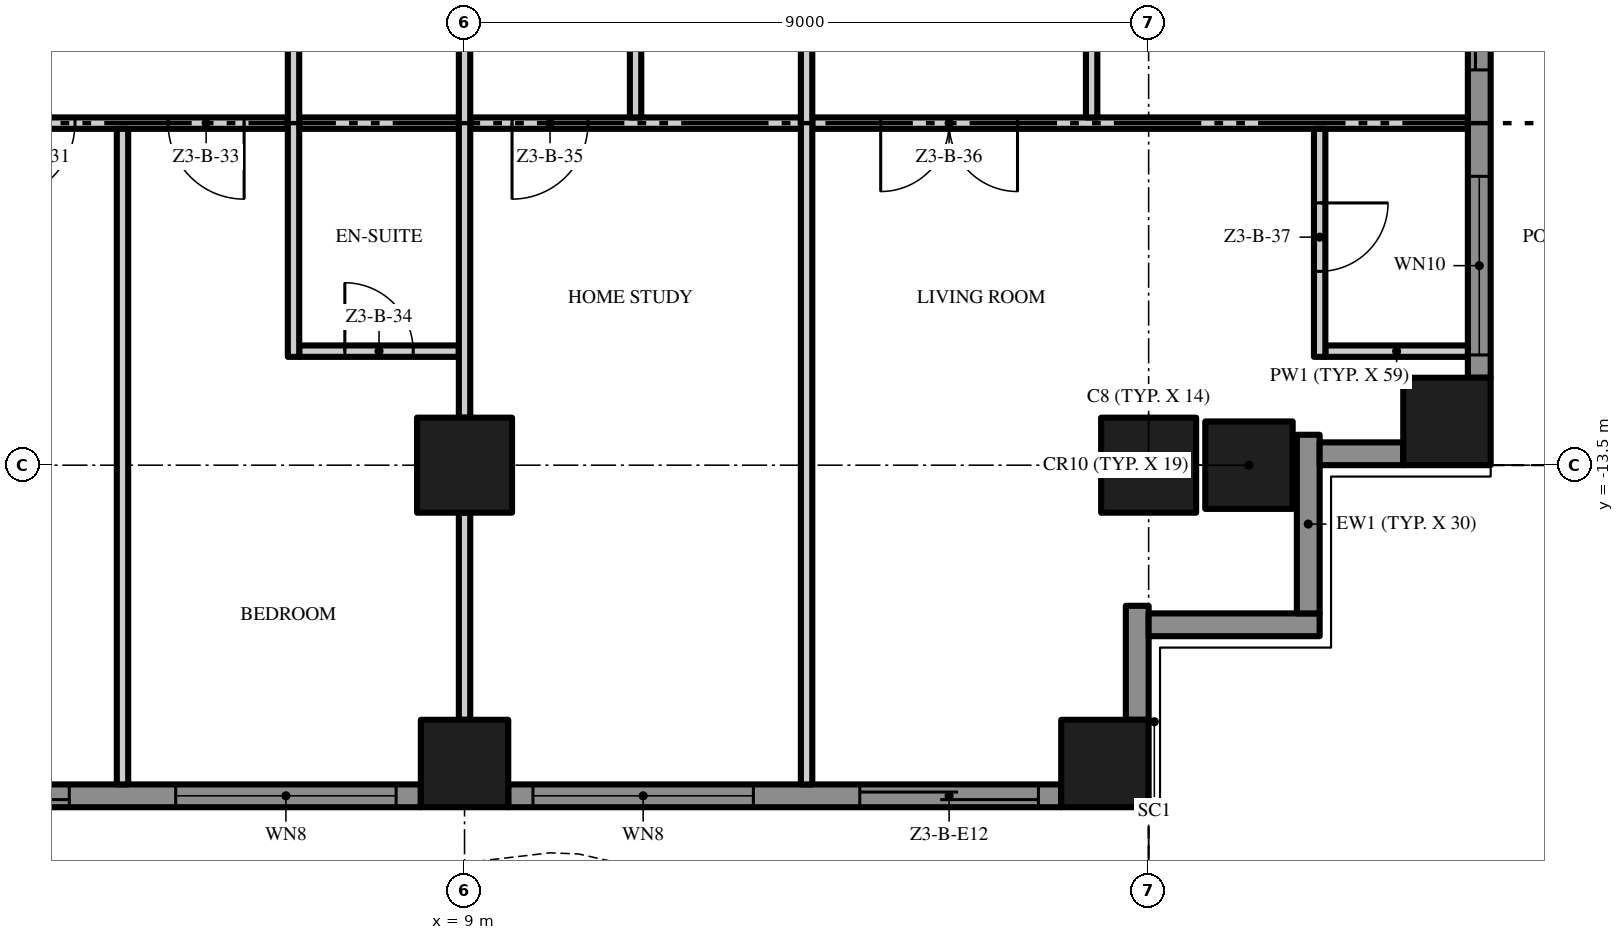
"""IFC4 building model, lengths in metres.
Left out: names, types, materials, properties, quantities, classifications, styles, units other than length and angle.
Written with IfcOpenShell. Run it as: python <this file> out.ifc"""

import sys

from ifc_helpers import new_model, si_unit, direction, frame, frame_2d, origin, origin_2d, place, context, subcontext, project, spatial, polyline, rectangle, outline, extrude, element, fill, save


model = new_model("IFC4")
c1 = context("Model", 3, precision=1e-05, world=origin(), true_north=direction((0.0, 1.0)))
c2 = subcontext(c1, "Body", "Model", "MODEL_VIEW")
j1 = project(units=[si_unit("LENGTHUNIT", "METRE"), si_unit("PLANEANGLEUNIT", "RADIAN")], contexts=[c1])
p1 = place(None, origin())
s1 = spatial("IfcSite", under=j1, at=p1, CompositionType="ELEMENT")
p2 = place(p1, origin())
s2 = spatial("IfcBuilding", under=s1, at=p2, CompositionType="ELEMENT")
p3 = place(p2, frame((0.0, 0.0, 140.2)))
s3 = spatial("IfcBuildingStorey", under=s2, at=p3, CompositionType="ELEMENT", Elevation=140.2)
p4 = place(p3, frame((18.0, -13.5, 0.0), z_axis=(0.0, 0.0, 1.0), x_axis=(1.0, 0.0, 0.0)))
e1 = element("IfcColumn", 1, at=p4, inside=s3, PredefinedType="COLUMN", context=c2, shape_type="SweptSolid", body=[
    extrude(rectangle(XDim=1.25, YDim=1.25, at=origin_2d()), origin(), (0.0, 0.0, 1.0), 3.5),
])
for number, where, z_axis, x_axis in (
    (2, (17.425, -17.425, 0.0), (0.0, 0.0, 1.0), (1.0, 0.0, 0.0)),
    (3, (21.925, -12.925, 0.0), (0.0, 0.0, 1.0), (1.0, 0.0, 0.0)),
    (4, (19.32, -13.5, 0.0), (0.0, 0.0, 1.0), (1.0, 0.0, 0.0)),
):
    element("IfcColumn", number, at=place(p3, frame(where, z_axis=z_axis, x_axis=x_axis)), inside=s3, PredefinedType="COLUMN", context=c2, shape_type="SweptSolid", body=[
        extrude(rectangle(XDim=1.15, YDim=1.15, at=origin_2d()), origin(), (0.0, 0.0, 1.0), 3.5),
    ])
p5 = place(p3, frame((9.0, -13.5, 0.0), z_axis=(0.0, 0.0, 1.0), x_axis=(1.0, 0.0, 0.0)))
e5 = element("IfcColumn", 5, at=p5, inside=s3, PredefinedType="COLUMN", context=c2, shape_type="SweptSolid", body=[
    extrude(rectangle(XDim=1.25, YDim=1.25, at=origin_2d()), origin(), (0.0, 0.0, 1.0), 3.5),
])
p6 = place(p3, frame((9.0, -17.425, 0.0), z_axis=(0.0, 0.0, 1.0), x_axis=(1.0, 0.0, 0.0)))
e6 = element("IfcColumn", 6, at=p6, inside=s3, PredefinedType="COLUMN", context=c2, shape_type="SweptSolid", body=[
    extrude(rectangle(XDim=1.15, YDim=1.15, at=origin_2d()), origin(), (0.0, 0.0, 1.0), 3.5),
])
p7 = place(p3, frame((8.425, -17.85, 0.0), z_axis=(0.0, 0.0, 1.0), x_axis=(-1.0, 0.0, 0.0)))
e7 = element("IfcWall", 7, at=p7, inside=s3, PredefinedType="SOLIDWALL", context=c2, shape_type="SweptSolid", body=[
    extrude(rectangle(XDim=7.85, YDim=0.3, at=frame_2d((3.925, 0.0))), origin(), (0.0, 0.0, 1.0), 3.5),
])
p8 = place(p7, frame((4.625, 0.0, 0.0)))
e8 = element("IfcOpeningElement", 8, at=p8, cuts=e7, PredefinedType="OPENING", context=c2, shape_type="SweptSolid", body=[
    extrude(rectangle(XDim=2.9, YDim=2.4, at=frame_2d((1.45, 1.2))), frame((0.0, 0.16, 0.0), z_axis=(0.0, -1.0, 0.0), x_axis=(1.0, 0.0, 0.0)), (0.0, 0.0, 1.0), 0.32),
])
p9 = place(p7, frame((0.325, 0.0, 0.45)))
e9 = element("IfcOpeningElement", 9, at=p9, cuts=e7, PredefinedType="OPENING", context=c2, shape_type="SweptSolid", body=[
    extrude(rectangle(XDim=2.9, YDim=2.65, at=frame_2d((1.45, 1.325))), frame((0.0, 0.16, 0.0), z_axis=(0.0, -1.0, 0.0), x_axis=(1.0, 0.0, 0.0)), (0.0, 0.0, 1.0), 0.32),
])
p10 = place(p3, frame((16.85, -17.85, 0.0), z_axis=(0.0, 0.0, 1.0), x_axis=(-1.0, 0.0, 0.0)))
e10 = element("IfcWall", 10, at=p10, inside=s3, PredefinedType="SOLIDWALL", context=c2, shape_type="SweptSolid", body=[
    extrude(rectangle(XDim=7.275, YDim=0.3, at=frame_2d((3.638, 0.0))), origin(), (0.0, 0.0, 1.0), 3.5),
])
p11 = place(p10, frame((4.05, 0.0, 0.45)))
e11 = element("IfcOpeningElement", 11, at=p11, cuts=e10, PredefinedType="OPENING", context=c2, shape_type="SweptSolid", body=[
    extrude(rectangle(XDim=2.9, YDim=2.65, at=frame_2d((1.45, 1.325))), frame((0.0, 0.16, 0.0), z_axis=(0.0, -1.0, 0.0), x_axis=(1.0, 0.0, 0.0)), (0.0, 0.0, 1.0), 0.32),
])
p12 = place(p10, frame((0.3, 0.0, 0.0)))
e12 = element("IfcOpeningElement", 12, at=p12, cuts=e10, PredefinedType="OPENING", context=c2, shape_type="SweptSolid", body=[
    extrude(rectangle(XDim=2.35, YDim=2.4, at=frame_2d((1.175, 1.2))), frame((0.0, 0.16, 0.0), z_axis=(0.0, -1.0, 0.0), x_axis=(1.0, 0.0, 0.0)), (0.0, 0.0, 1.0), 0.32),
])
p13 = place(p3, frame((17.85, -15.35, 0.0), z_axis=(0.0, 0.0, 1.0), x_axis=(0.0, -1.0, 0.0)))
e13 = element("IfcWall", 13, at=p13, inside=s3, PredefinedType="SOLIDWALL", context=c2, shape_type="SweptSolid", body=[
    extrude(rectangle(XDim=1.5, YDim=0.3, at=frame_2d((0.75, 0.0))), origin(), (0.0, 0.0, 1.0), 3.5),
])
p14 = place(p3, frame((20.25, -15.6, 0.0), z_axis=(0.0, 0.0, 1.0), x_axis=(-1.0, 0.0, 0.0)))
e14 = element("IfcWall", 14, at=p14, inside=s3, PredefinedType="SOLIDWALL", context=c2, shape_type="SweptSolid", body=[
    extrude(rectangle(XDim=2.25, YDim=0.3, at=frame_2d((1.125, 0.0))), origin(), (0.0, 0.0, 1.0), 3.5),
])
p15 = place(p3, frame((20.1, -13.1, 0.0), z_axis=(0.0, 0.0, 1.0), x_axis=(0.0, -1.0, 0.0)))
e15 = element("IfcWall", 15, at=p15, inside=s3, PredefinedType="SOLIDWALL", context=c2, shape_type="SweptSolid", body=[
    extrude(rectangle(XDim=2.35, YDim=0.3, at=frame_2d((1.175, 0.0))), origin(), (0.0, 0.0, 1.0), 3.5),
])
p16 = place(p3, frame((21.35, -13.35, 0.0), z_axis=(0.0, 0.0, 1.0), x_axis=(-1.0, 0.0, 0.0)))
e16 = element("IfcWall", 16, at=p16, inside=s3, PredefinedType="SOLIDWALL", context=c2, shape_type="SweptSolid", body=[
    extrude(rectangle(XDim=1.1, YDim=0.3, at=frame_2d((0.55, 0.0))), origin(), (0.0, 0.0, 1.0), 3.5),
])
p17 = place(p3, frame((22.35, -5.075, 0.0), z_axis=(0.0, 0.0, 1.0), x_axis=(0.0, -1.0, 0.0)))
e17 = element("IfcWall", 17, at=p17, inside=s3, PredefinedType="SOLIDWALL", context=c2, shape_type="SweptSolid", body=[
    extrude(rectangle(XDim=7.275, YDim=0.3, at=frame_2d((3.638, 0.0))), origin(), (0.0, 0.0, 1.0), 3.5),
])
p18 = place(p17, frame((4.625, 0.0, 0.45)))
e18 = element("IfcOpeningElement", 18, at=p18, cuts=e17, PredefinedType="OPENING", context=c2, shape_type="SweptSolid", body=[
    extrude(rectangle(XDim=2.35, YDim=2.65, at=frame_2d((1.175, 1.325))), frame((0.0, 0.16, 0.0), z_axis=(0.0, -1.0, 0.0), x_axis=(1.0, 0.0, 0.0)), (0.0, 0.0, 1.0), 0.32),
])
p19 = place(p17, frame((0.325, 0.0, 0.0)))
e19 = element("IfcOpeningElement", 19, at=p19, cuts=e17, PredefinedType="OPENING", context=c2, shape_type="SweptSolid", body=[
    extrude(rectangle(XDim=2.9, YDim=2.4, at=frame_2d((1.45, 1.2))), frame((0.0, 0.16, 0.0), z_axis=(0.0, -1.0, 0.0), x_axis=(1.0, 0.0, 0.0)), (0.0, 0.0, 1.0), 0.32),
])
p20 = place(p3, origin())
e20 = element("IfcWall", 20, at=p20, inside=s3, PredefinedType="USERDEFINED", context=c2, shape_type="SweptSolid", body=[
    extrude(outline(polyline([(-18.0, -18.951), (-16.5, -19.612), (-15.0, -20.345), (-13.5, -20.869), (-12.375, -21.0), (-12.0, -20.985), (-10.5, -20.649), (-9.0, -19.988), (-7.5, -19.255), (-6.0, -18.731), (-4.875, -18.6), (-4.5, -18.615), (-3.0, -18.951), (-1.5, -19.612), (0.0, -20.345), (1.5, -20.869), (2.625, -21.0), (3.0, -20.985), (4.5, -20.649), (6.0, -19.988), (7.5, -19.255), (9.0, -18.731), (10.125, -18.6), (10.5, -18.615), (12.0, -18.951), (13.5, -19.612), (15.0, -20.345), (16.5, -20.869), (17.625, -21.0), (18.0, -20.985), (17.99, -20.735), (17.635, -20.749), (16.556, -20.624), (15.096, -20.114), (13.605, -19.385), (12.079, -18.713), (10.533, -18.366), (10.115, -18.349), (8.944, -18.486), (7.404, -19.024), (5.895, -19.761), (4.421, -20.41), (2.967, -20.736), (2.635, -20.749), (1.556, -20.624), (0.096, -20.114), (-1.395, -19.385), (-2.921, -18.713), (-4.467, -18.366), (-4.885, -18.349), (-6.056, -18.486), (-7.596, -19.024), (-9.105, -19.761), (-10.579, -20.41), (-12.033, -20.736), (-12.365, -20.749), (-13.444, -20.624), (-14.904, -20.114), (-16.395, -19.385), (-17.899, -18.723), (-18.0, -18.951)])), origin(), (0.0, 0.0, 1.0), 0.9),
])
p21 = place(p3, origin())
e21 = element("IfcWall", 21, at=p21, inside=s3, PredefinedType="USERDEFINED", context=c2, shape_type="SweptSolid", body=[
    extrude(outline(polyline([(23.451, -13.5), (24.112, -12.0), (24.845, -10.5), (25.369, -9.0), (25.5, -7.875), (25.485, -7.5), (25.149, -6.0), (24.488, -4.5), (23.755, -3.0), (23.231, -1.5), (23.1, -0.375), (23.115, 0.0), (23.451, 1.5), (24.112, 3.0), (24.845, 4.5), (25.369, 6.0), (25.5, 7.125), (25.485, 7.5), (25.149, 9.0), (24.488, 10.5), (23.755, 12.0), (23.231, 13.5), (23.1, 14.625), (23.115, 15.0), (23.451, 16.5), (24.112, 18.0), (23.883, 18.101), (23.213, 16.579), (22.866, 15.033), (22.849, 14.615), (22.986, 13.444), (23.524, 11.904), (24.261, 10.395), (24.91, 8.921), (25.236, 7.467), (25.249, 7.135), (25.124, 6.056), (24.614, 4.596), (23.885, 3.105), (23.213, 1.579), (22.866, 0.033), (22.849, -0.385), (22.986, -1.556), (23.524, -3.096), (24.261, -4.605), (24.91, -6.079), (25.236, -7.533), (25.249, -7.865), (25.124, -8.944), (24.614, -10.404), (23.885, -11.895), (23.223, -13.399), (23.451, -13.5)])), origin(), (0.0, 0.0, 1.0), 0.9),
])
p22 = place(p3, frame((6.825, -12.0, 0.0), z_axis=(0.0, 0.0, 1.0), x_axis=(1.0, 0.0, 0.0)))
e22 = element("IfcWall", 22, at=p22, inside=s3, PredefinedType="PARTITIONING", context=c2, shape_type="SweptSolid", body=[
    extrude(rectangle(XDim=2.1, YDim=0.15, at=frame_2d((1.05, 0.0))), origin(), (0.0, 0.0, 1.0), 3.5),
])
p23 = place(p22, frame((0.6, 0.0, 0.0)))
e23 = element("IfcOpeningElement", 23, at=p23, cuts=e22, PredefinedType="OPENING", context=c2, shape_type="SweptSolid", body=[
    extrude(rectangle(XDim=0.9, YDim=2.1, at=frame_2d((0.45, 1.05))), frame((0.0, 0.085, 0.0), z_axis=(0.0, -1.0, 0.0), x_axis=(1.0, 0.0, 0.0)), (0.0, 0.0, 1.0), 0.17),
])
p24 = place(p3, frame((20.325, -12.0, 0.0), z_axis=(0.0, 0.0, 1.0), x_axis=(1.0, 0.0, 0.0)))
e24 = element("IfcWall", 24, at=p24, inside=s3, PredefinedType="PARTITIONING", context=c2, shape_type="SweptSolid", body=[
    extrude(rectangle(XDim=1.875, YDim=0.15, at=frame_2d((0.938, 0.0))), origin(), (0.0, 0.0, 1.0), 3.5),
])
p25 = place(p3, frame((6.675, -9.0, 0.0), z_axis=(0.0, 0.0, 1.0), x_axis=(-1.0, 0.0, 0.0)))
e25 = element("IfcWall", 25, at=p25, inside=s3, PredefinedType="PARTITIONING", context=c2, shape_type="SweptSolid", body=[
    extrude(rectangle(XDim=4.35, YDim=0.15, at=frame_2d((2.175, 0.0))), origin(), (0.0, 0.0, 1.0), 3.5),
])
p26 = place(p25, frame((2.8, 0.0, 0.0)))
e26 = element("IfcOpeningElement", 26, at=p26, cuts=e25, PredefinedType="OPENING", context=c2, shape_type="SweptSolid", body=[
    extrude(rectangle(XDim=1.0, YDim=2.4, at=frame_2d((0.5, 1.2))), frame((0.0, 0.085, 0.0), z_axis=(0.0, -1.0, 0.0), x_axis=(1.0, 0.0, 0.0)), (0.0, 0.0, 1.0), 0.17),
])
p27 = place(p25, frame((0.575, 0.0, 0.0)))
e27 = element("IfcOpeningElement", 27, at=p27, cuts=e25, PredefinedType="OPENING", context=c2, shape_type="SweptSolid", body=[
    extrude(rectangle(XDim=1.0, YDim=2.4, at=frame_2d((0.5, 1.2))), frame((0.0, 0.085, 0.0), z_axis=(0.0, -1.0, 0.0), x_axis=(1.0, 0.0, 0.0)), (0.0, 0.0, 1.0), 0.17),
])
p28 = place(p3, frame((6.825, -9.0, 0.0), z_axis=(0.0, 0.0, 1.0), x_axis=(1.0, 0.0, 0.0)))
e28 = element("IfcWall", 28, at=p28, inside=s3, PredefinedType="PARTITIONING", context=c2, shape_type="SweptSolid", body=[
    extrude(rectangle(XDim=2.1, YDim=0.15, at=frame_2d((1.05, 0.0))), origin(), (0.0, 0.0, 1.0), 3.5),
])
p29 = place(p3, frame((13.425, -9.0, 0.0), z_axis=(0.0, 0.0, 1.0), x_axis=(-1.0, 0.0, 0.0)))
e29 = element("IfcWall", 29, at=p29, inside=s3, PredefinedType="PARTITIONING", context=c2, shape_type="SweptSolid", body=[
    extrude(rectangle(XDim=4.35, YDim=0.15, at=frame_2d((2.175, 0.0))), origin(), (0.0, 0.0, 1.0), 3.5),
])
p30 = place(p29, frame((2.8, 0.0, 0.0)))
e30 = element("IfcOpeningElement", 30, at=p30, cuts=e29, PredefinedType="OPENING", context=c2, shape_type="SweptSolid", body=[
    extrude(rectangle(XDim=1.0, YDim=2.4, at=frame_2d((0.5, 1.2))), frame((0.0, 0.085, 0.0), z_axis=(0.0, -1.0, 0.0), x_axis=(1.0, 0.0, 0.0)), (0.0, 0.0, 1.0), 0.17),
])
p31 = place(p3, frame((22.2, -9.0, 0.0), z_axis=(0.0, 0.0, 1.0), x_axis=(-1.0, 0.0, 0.0)))
e31 = element("IfcWall", 31, at=p31, inside=s3, PredefinedType="PARTITIONING", context=c2, shape_type="SweptSolid", body=[
    extrude(rectangle(XDim=8.625, YDim=0.15, at=frame_2d((4.312, 0.0))), origin(), (0.0, 0.0, 1.0), 3.5),
])
p32 = place(p31, frame((5.925, 0.0, 0.0)))
e32 = element("IfcOpeningElement", 32, at=p32, cuts=e31, PredefinedType="OPENING", context=c2, shape_type="SweptSolid", body=[
    extrude(rectangle(XDim=1.8, YDim=2.4, at=frame_2d((0.9, 1.2))), frame((0.0, 0.085, 0.0), z_axis=(0.0, -1.0, 0.0), x_axis=(1.0, 0.0, 0.0)), (0.0, 0.0, 1.0), 0.17),
])
p33 = place(p3, frame((4.5, -17.7, 0.0), z_axis=(0.0, 0.0, 1.0), x_axis=(0.0, 1.0, 0.0)))
e33 = element("IfcWall", 33, at=p33, inside=s3, PredefinedType="PARTITIONING", context=c2, shape_type="SweptSolid", body=[
    extrude(rectangle(XDim=8.625, YDim=0.15, at=frame_2d((4.312, 0.0))), origin(), (0.0, 0.0, 1.0), 3.5),
])
p34 = place(p3, frame((6.75, -12.075, 0.0), z_axis=(0.0, 0.0, 1.0), x_axis=(0.0, 1.0, 0.0)))
e34 = element("IfcWall", 34, at=p34, inside=s3, PredefinedType="PARTITIONING", context=c2, shape_type="SweptSolid", body=[
    extrude(rectangle(XDim=7.65, YDim=0.15, at=frame_2d((3.825, 0.0))), origin(), (0.0, 0.0, 1.0), 3.5),
])
p35 = place(p3, frame((9.0, -16.85, 0.0), z_axis=(0.0, 0.0, 1.0), x_axis=(0.0, 1.0, 0.0)))
e35 = element("IfcWall", 35, at=p35, inside=s3, PredefinedType="PARTITIONING", context=c2, shape_type="SweptSolid", body=[
    extrude(rectangle(XDim=2.725, YDim=0.15, at=frame_2d((1.363, 0.0))), origin(), (0.0, 0.0, 1.0), 3.5),
])
p36 = place(p3, frame((9.0, -12.875, 0.0), z_axis=(0.0, 0.0, 1.0), x_axis=(0.0, 1.0, 0.0)))
e36 = element("IfcWall", 36, at=p36, inside=s3, PredefinedType="PARTITIONING", context=c2, shape_type="SweptSolid", body=[
    extrude(rectangle(XDim=7.75, YDim=0.15, at=frame_2d((3.875, 0.0))), origin(), (0.0, 0.0, 1.0), 3.5),
])
p37 = place(p3, frame((11.25, -8.925, 0.0), z_axis=(0.0, 0.0, 1.0), x_axis=(0.0, 1.0, 0.0)))
e37 = element("IfcWall", 37, at=p37, inside=s3, PredefinedType="PARTITIONING", context=c2, shape_type="SweptSolid", body=[
    extrude(rectangle(XDim=4.5, YDim=0.15, at=frame_2d((2.25, 0.0))), origin(), (0.0, 0.0, 1.0), 3.5),
])
p38 = place(p3, frame((13.5, -17.7, 0.0), z_axis=(0.0, 0.0, 1.0), x_axis=(0.0, 1.0, 0.0)))
e38 = element("IfcWall", 38, at=p38, inside=s3, PredefinedType="PARTITIONING", context=c2, shape_type="SweptSolid", body=[
    extrude(rectangle(XDim=13.275, YDim=0.15, at=frame_2d((6.638, 0.0))), origin(), (0.0, 0.0, 1.0), 3.5),
])
p39 = place(p3, frame((17.25, -8.925, 0.0), z_axis=(0.0, 0.0, 1.0), x_axis=(0.0, 1.0, 0.0)))
e39 = element("IfcWall", 39, at=p39, inside=s3, PredefinedType="PARTITIONING", context=c2, shape_type="SweptSolid", body=[
    extrude(rectangle(XDim=4.5, YDim=0.15, at=frame_2d((2.25, 0.0))), origin(), (0.0, 0.0, 1.0), 3.5),
])
p40 = place(p3, frame((20.25, -9.075, 0.0), z_axis=(0.0, 0.0, 1.0), x_axis=(0.0, -1.0, 0.0)))
e40 = element("IfcWall", 40, at=p40, inside=s3, PredefinedType="PARTITIONING", context=c2, shape_type="SweptSolid", body=[
    extrude(rectangle(XDim=3.0, YDim=0.15, at=frame_2d((1.5, 0.0))), origin(), (0.0, 0.0, 1.0), 3.5),
])
p41 = place(p40, frame((0.975, 0.0, 0.0)))
e41 = element("IfcOpeningElement", 41, at=p41, cuts=e40, PredefinedType="OPENING", context=c2, shape_type="SweptSolid", body=[
    extrude(rectangle(XDim=0.9, YDim=2.1, at=frame_2d((0.45, 1.05))), frame((0.0, 0.085, 0.0), z_axis=(0.0, -1.0, 0.0), x_axis=(1.0, 0.0, 0.0)), (0.0, 0.0, 1.0), 0.17),
])
p42 = place(p8, origin())
e42 = element("IfcDoor", 42, at=p42, inside=s3, OperationType="SINGLE_SWING_LEFT", PredefinedType="DOOR", context=c2, shape_type="SweptSolid", body=[
    extrude(rectangle(XDim=2.9, YDim=2.4, at=frame_2d((1.45, 1.2))), frame((0.0, 0.025, 0.0), z_axis=(0.0, -1.0, 0.0), x_axis=(1.0, 0.0, 0.0)), (0.0, 0.0, 1.0), 0.05),
])
fill(e8, e42)
p43 = place(p9, origin())
e43 = element("IfcWindow", 43, at=p43, inside=s3, PartitioningType="SINGLE_PANEL", PredefinedType="WINDOW", context=c2, shape_type="SweptSolid", body=[
    extrude(rectangle(XDim=2.9, YDim=2.65, at=frame_2d((1.45, 1.325))), frame((0.0, 0.03, 0.0), z_axis=(0.0, -1.0, 0.0), x_axis=(1.0, 0.0, 0.0)), (0.0, 0.0, 1.0), 0.06),
])
fill(e9, e43)
p44 = place(p11, origin())
e44 = element("IfcWindow", 44, at=p44, inside=s3, PartitioningType="SINGLE_PANEL", PredefinedType="WINDOW", context=c2, shape_type="SweptSolid", body=[
    extrude(rectangle(XDim=2.9, YDim=2.65, at=frame_2d((1.45, 1.325))), frame((0.0, 0.03, 0.0), z_axis=(0.0, -1.0, 0.0), x_axis=(1.0, 0.0, 0.0)), (0.0, 0.0, 1.0), 0.06),
])
fill(e11, e44)
p45 = place(p12, origin())
e45 = element("IfcDoor", 45, at=p45, inside=s3, OperationType="SINGLE_SWING_LEFT", PredefinedType="DOOR", context=c2, shape_type="SweptSolid", body=[
    extrude(rectangle(XDim=2.35, YDim=2.4, at=frame_2d((1.175, 1.2))), frame((0.0, 0.025, 0.0), z_axis=(0.0, -1.0, 0.0), x_axis=(1.0, 0.0, 0.0)), (0.0, 0.0, 1.0), 0.05),
])
fill(e12, e45)
p46 = place(p18, origin())
e46 = element("IfcWindow", 46, at=p46, inside=s3, PartitioningType="SINGLE_PANEL", PredefinedType="WINDOW", context=c2, shape_type="SweptSolid", body=[
    extrude(rectangle(XDim=2.35, YDim=2.65, at=frame_2d((1.175, 1.325))), frame((0.0, 0.03, 0.0), z_axis=(0.0, -1.0, 0.0), x_axis=(1.0, 0.0, 0.0)), (0.0, 0.0, 1.0), 0.06),
])
fill(e18, e46)
p47 = place(p19, origin())
e47 = element("IfcDoor", 47, at=p47, inside=s3, OperationType="SINGLE_SWING_LEFT", PredefinedType="DOOR", context=c2, shape_type="SweptSolid", body=[
    extrude(rectangle(XDim=2.9, YDim=2.4, at=frame_2d((1.45, 1.2))), frame((0.0, 0.025, 0.0), z_axis=(0.0, -1.0, 0.0), x_axis=(1.0, 0.0, 0.0)), (0.0, 0.0, 1.0), 0.05),
])
fill(e19, e47)
p48 = place(p26, origin())
e48 = element("IfcDoor", 48, at=p48, inside=s3, OperationType="SINGLE_SWING_RIGHT", PredefinedType="DOOR", context=c2, shape_type="SweptSolid", body=[
    extrude(rectangle(XDim=1.0, YDim=2.4, at=frame_2d((0.5, 1.2))), frame((0.0, 0.025, 0.0), z_axis=(0.0, -1.0, 0.0), x_axis=(1.0, 0.0, 0.0)), (0.0, 0.0, 1.0), 0.05),
])
fill(e26, e48)
p49 = place(p27, origin())
e49 = element("IfcDoor", 49, at=p49, inside=s3, OperationType="SINGLE_SWING_LEFT", PredefinedType="DOOR", context=c2, shape_type="SweptSolid", body=[
    extrude(rectangle(XDim=1.0, YDim=2.4, at=frame_2d((0.5, 1.2))), frame((0.0, 0.025, 0.0), z_axis=(0.0, -1.0, 0.0), x_axis=(1.0, 0.0, 0.0)), (0.0, 0.0, 1.0), 0.05),
])
fill(e27, e49)
p50 = place(p23, origin())
e50 = element("IfcDoor", 50, at=p50, inside=s3, OperationType="SINGLE_SWING_LEFT", PredefinedType="DOOR", context=c2, shape_type="SweptSolid", body=[
    extrude(rectangle(XDim=0.9, YDim=2.1, at=frame_2d((0.45, 1.05))), frame((0.0, 0.025, 0.0), z_axis=(0.0, -1.0, 0.0), x_axis=(1.0, 0.0, 0.0)), (0.0, 0.0, 1.0), 0.05),
])
fill(e23, e50)
p51 = place(p30, origin())
e51 = element("IfcDoor", 51, at=p51, inside=s3, OperationType="SINGLE_SWING_RIGHT", PredefinedType="DOOR", context=c2, shape_type="SweptSolid", body=[
    extrude(rectangle(XDim=1.0, YDim=2.4, at=frame_2d((0.5, 1.2))), frame((0.0, 0.025, 0.0), z_axis=(0.0, -1.0, 0.0), x_axis=(1.0, 0.0, 0.0)), (0.0, 0.0, 1.0), 0.05),
])
fill(e30, e51)
p52 = place(p32, origin())
e52 = element("IfcDoor", 52, at=p52, inside=s3, OperationType="DOUBLE_DOOR_SINGLE_SWING", PredefinedType="DOOR", context=c2, shape_type="SweptSolid", body=[
    extrude(rectangle(XDim=1.8, YDim=2.4, at=frame_2d((0.9, 1.2))), frame((0.0, 0.025, 0.0), z_axis=(0.0, -1.0, 0.0), x_axis=(1.0, 0.0, 0.0)), (0.0, 0.0, 1.0), 0.05),
])
fill(e32, e52)
p53 = place(p41, origin())
e53 = element("IfcDoor", 53, at=p53, inside=s3, OperationType="SINGLE_SWING_LEFT", PredefinedType="DOOR", context=c2, shape_type="SweptSolid", body=[
    extrude(rectangle(XDim=0.9, YDim=2.1, at=frame_2d((0.45, 1.05))), frame((0.0, 0.025, 0.0), z_axis=(0.0, -1.0, 0.0), x_axis=(1.0, 0.0, 0.0)), (0.0, 0.0, 1.0), 0.05),
])
fill(e41, e53)
save(model, sys.argv[1])
